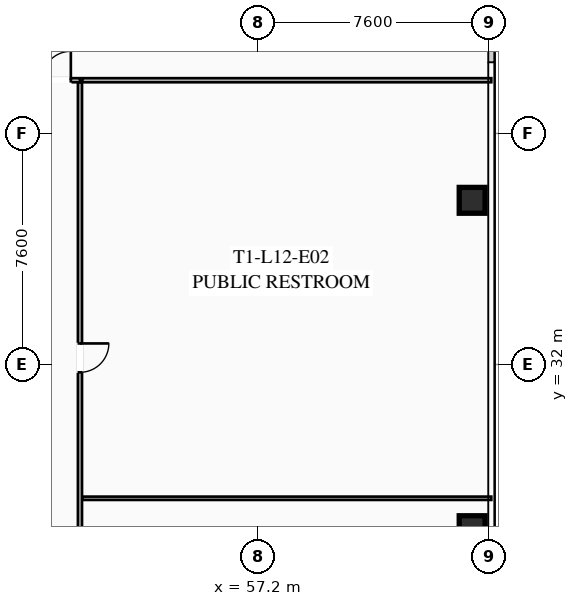
"""IFC4 building model, lengths in metres.
Left out: names, types, materials, properties, quantities, classifications, styles, units other than length and angle.
Written with IfcOpenShell. Run it as: python <this file> out.ifc"""

import sys

from ifc_helpers import new_model, si_unit, direction, frame, frame_2d, origin, origin_2d, place, context, subcontext, project, spatial, rectangle, hollow_rectangle, extrude, element, fill, save


model = new_model("IFC4")
c1 = context("Model", 3, precision=1e-05, world=origin(), true_north=direction((0.0, 1.0)))
c2 = subcontext(c1, "Body", "Model", "MODEL_VIEW")
j1 = project(units=[si_unit("LENGTHUNIT", "METRE"), si_unit("PLANEANGLEUNIT", "RADIAN")], contexts=[c1])
p1 = place(None, origin())
s1 = spatial("IfcSite", under=j1, at=p1, CompositionType="ELEMENT")
p2 = place(p1, origin())
s2 = spatial("IfcBuilding", under=s1, at=p2, CompositionType="ELEMENT")
p3 = place(p2, frame((0.0, 0.0, 49.45)))
s3 = spatial("IfcBuildingStorey", under=s2, at=p3, CompositionType="ELEMENT", Elevation=49.45)
for number, where, z_axis, x_axis in (
    (1, (64.25, 26.6, 0.0), (0.0, 0.0, 1.0), (1.0, 0.0, 0.0)),
    (2, (64.25, 37.4, 0.0), (0.0, 0.0, 1.0), (1.0, 0.0, 0.0)),
):
    element("IfcColumn", number, at=place(p3, frame(where, z_axis=z_axis, x_axis=x_axis)), inside=s3, PredefinedType="COLUMN", context=c2, shape_type="SweptSolid", body=[
        extrude(hollow_rectangle(XDim=0.85, YDim=0.85, WallThickness=0.035, at=origin_2d()), origin(), (0.0, 0.0, 1.0), 3.35),
    ])
p4 = place(p3, frame((22.35, 41.35, 0.0), z_axis=(0.0, 0.0, 1.0), x_axis=(1.0, 0.0, 0.0)))
e3 = element("IfcWall", 3, at=p4, inside=s3, PredefinedType="PARTITIONING", context=c2, shape_type="SweptSolid", body=[
    extrude(rectangle(XDim=29.0, YDim=0.135, at=frame_2d((14.5, 0.0))), origin(), (0.0, 0.0, 1.0), 2.703),
])
p5 = place(p4, frame((0.3, 0.0, 0.0)))
e4 = element("IfcOpeningElement", 4, at=p5, cuts=e3, PredefinedType="OPENING", context=c2, shape_type="SweptSolid", body=[
    extrude(rectangle(XDim=0.95, YDim=2.05, at=frame_2d((0.475, 1.025))), frame((0.0, 0.077, 0.0), z_axis=(0.0, -1.0, 0.0), x_axis=(1.0, 0.0, 0.0)), (0.0, 0.0, 1.0), 0.155),
])
p6 = place(p4, frame((15.416, 0.0, 0.0)))
e5 = element("IfcOpeningElement", 5, at=p6, cuts=e3, PredefinedType="OPENING", context=c2, shape_type="SweptSolid", body=[
    extrude(rectangle(XDim=0.95, YDim=2.05, at=frame_2d((0.475, 1.025))), frame((0.0, 0.077, 0.0), z_axis=(0.0, -1.0, 0.0), x_axis=(1.0, 0.0, 0.0)), (0.0, 0.0, 1.0), 0.155),
])
p7 = place(p4, frame((19.447, 0.0, 0.0)))
e6 = element("IfcOpeningElement", 6, at=p7, cuts=e3, PredefinedType="OPENING", context=c2, shape_type="SweptSolid", body=[
    extrude(rectangle(XDim=0.95, YDim=2.05, at=frame_2d((0.475, 1.025))), frame((0.0, 0.077, 0.0), z_axis=(0.0, -1.0, 0.0), x_axis=(1.0, 0.0, 0.0)), (0.0, 0.0, 1.0), 0.155),
])
p8 = place(p4, frame((27.75, 0.0, 0.0)))
e7 = element("IfcOpeningElement", 7, at=p8, cuts=e3, PredefinedType="OPENING", context=c2, shape_type="SweptSolid", body=[
    extrude(rectangle(XDim=0.95, YDim=2.05, at=frame_2d((0.475, 1.025))), frame((0.0, 0.077, 0.0), z_axis=(0.0, -1.0, 0.0), x_axis=(1.0, 0.0, 0.0)), (0.0, 0.0, 1.0), 0.155),
])
p9 = place(p3, frame((51.35, 41.27, 0.0), z_axis=(0.0, 0.0, 1.0), x_axis=(0.0, -1.0, 0.0)))
e8 = element("IfcWall", 8, at=p9, inside=s3, PredefinedType="PARTITIONING", context=c2, shape_type="SweptSolid", body=[
    extrude(rectangle(XDim=19.71, YDim=0.135, at=frame_2d((9.855, 0.0))), origin(), (0.0, 0.0, 1.0), 2.703),
])
p10 = place(p9, frame((18.46, 0.0, 0.0)))
e9 = element("IfcOpeningElement", 9, at=p10, cuts=e8, PredefinedType="OPENING", context=c2, shape_type="SweptSolid", body=[
    extrude(rectangle(XDim=0.95, YDim=2.05, at=frame_2d((0.475, 1.025))), frame((0.0, 0.077, 0.0), z_axis=(0.0, -1.0, 0.0), x_axis=(1.0, 0.0, 0.0)), (0.0, 0.0, 1.0), 0.155),
])
p11 = place(p9, frame((8.577, 0.0, 0.0)))
e10 = element("IfcOpeningElement", 10, at=p11, cuts=e8, PredefinedType="OPENING", context=c2, shape_type="SweptSolid", body=[
    extrude(rectangle(XDim=0.95, YDim=2.05, at=frame_2d((0.475, 1.025))), frame((0.0, 0.077, 0.0), z_axis=(0.0, -1.0, 0.0), x_axis=(1.0, 0.0, 0.0)), (0.0, 0.0, 1.0), 0.155),
])
p12 = place(p3, frame((64.88, 41.35, 0.0), z_axis=(0.0, 0.0, 1.0), x_axis=(-1.0, 0.0, 0.0)))
e11 = element("IfcWall", 11, at=p12, inside=s3, PredefinedType="PARTITIONING", context=c2, shape_type="SweptSolid", body=[
    extrude(rectangle(XDim=13.45, YDim=0.135, at=frame_2d((6.725, 0.0))), origin(), (0.0, 0.0, 1.0), 2.703),
])
p13 = place(p3, frame((51.43, 27.6, 0.0), z_axis=(0.0, 0.0, 1.0), x_axis=(1.0, 0.0, 0.0)))
e12 = element("IfcWall", 12, at=p13, inside=s3, PredefinedType="PARTITIONING", context=c2, shape_type="SweptSolid", body=[
    extrude(rectangle(XDim=13.45, YDim=0.11, at=frame_2d((6.725, 0.0))), origin(), (0.0, 0.0, 1.0), 2.703),
])
p14 = place(p8, origin())
e13 = element("IfcDoor", 13, at=p14, inside=s3, OperationType="SINGLE_SWING_RIGHT", PredefinedType="DOOR", context=c2, shape_type="SweptSolid", body=[
    extrude(rectangle(XDim=0.95, YDim=2.05, at=frame_2d((0.475, 1.025))), frame((0.0, 0.025, 0.0), z_axis=(0.0, -1.0, 0.0), x_axis=(1.0, 0.0, 0.0)), (0.0, 0.0, 1.0), 0.05),
])
fill(e7, e13)
p15 = place(p11, origin())
e14 = element("IfcDoor", 14, at=p15, inside=s3, OperationType="SINGLE_SWING_LEFT", PredefinedType="DOOR", context=c2, shape_type="SweptSolid", body=[
    extrude(rectangle(XDim=0.95, YDim=2.05, at=frame_2d((0.475, 1.025))), frame((0.0, 0.025, 0.0), z_axis=(0.0, -1.0, 0.0), x_axis=(1.0, 0.0, 0.0)), (0.0, 0.0, 1.0), 0.05),
])
fill(e10, e14)
save(model, sys.argv[1])
